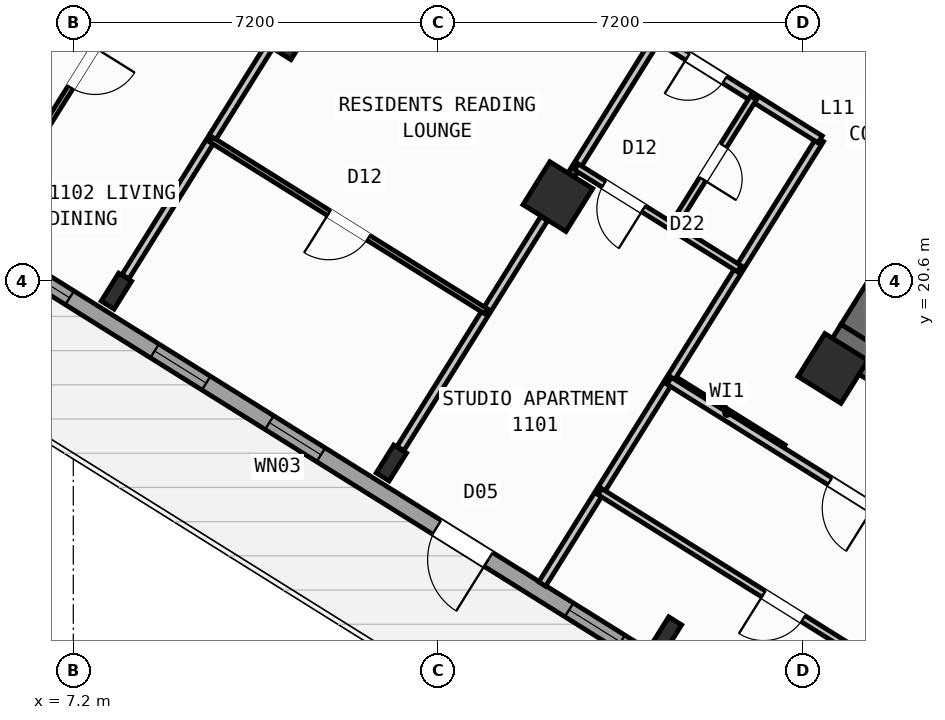
"""IFC4 building model, lengths in metres.
Left out: names, types, materials, properties, quantities, classifications, styles, units other than length and angle.
Written with IfcOpenShell. Run it as: python <this file> out.ifc"""

import sys

from ifc_helpers import new_model, si_unit, direction, frame, frame_2d, origin, origin_2d, place, context, subcontext, project, spatial, rectangle, hollow_rectangle, i_section, extrude, source, transform, mapped, element, fill, save


model = new_model("IFC4")
c1 = context("Model", 3, precision=1e-05, world=origin(), true_north=direction((0.0, 1.0)))
c2 = subcontext(c1, "Body", "Model", "MODEL_VIEW")
j1 = project(units=[si_unit("LENGTHUNIT", "METRE"), si_unit("PLANEANGLEUNIT", "RADIAN")], contexts=[c1])
p1 = place(None, origin())
s1 = spatial("IfcSite", under=j1, at=p1, CompositionType="ELEMENT")
p2 = place(p1, origin())
s2 = spatial("IfcBuilding", under=s1, at=p2, CompositionType="ELEMENT")
p3 = place(p2, frame((0.0, 0.0, 45.6)))
s3 = spatial("IfcBuildingStorey", under=s2, at=p3, CompositionType="ELEMENT", Elevation=45.6)
p4 = place(p3, frame((33.409, 12.45, 0.0), z_axis=(0.0, 0.0, 1.0), x_axis=(-0.848051132073, 0.529914405721, 0.0)))
e1 = element("IfcWall", 1, at=p4, inside=s3, PredefinedType="SHEAR", context=c2, shape_type="SweptSolid", body=[
    extrude(rectangle(XDim=13.24, YDim=0.65, at=frame_2d((6.62, 0.0))), origin(), (0.0, 0.0, 1.0), 3.35),
])
p5 = place(p3, frame((26.007, 24.976, 0.0), z_axis=(0.0, 0.0, 1.0), x_axis=(-0.529916319127, -0.848049936456, 0.0)))
e2 = element("IfcWall", 2, at=p5, inside=s3, PredefinedType="SHEAR", context=c2, shape_type="SweptSolid", body=[
    extrude(rectangle(XDim=6.375, YDim=0.65, at=frame_2d((3.188, 0.0))), origin(), (0.0, 0.0, 1.0), 3.35),
])
m1 = source(origin(), c2, "Body", "SweptSolid", [
    extrude(hollow_rectangle(XDim=1.0, YDim=1.0, WallThickness=0.04, at=origin_2d()), origin(), (0.0, 0.0, 1.0), 3.6),
])
p6 = place(p3, frame((22.191, 18.87, 0.0), z_axis=(0.0, 0.0, 1.0), x_axis=(-0.848048096156, 0.529919264233, 0.0)))
e3 = element("IfcColumn", 3, at=p6, inside=s3, PredefinedType="COLUMN", context=c2, shape_type="MappedRepresentation", body=[
    mapped(m1, transform((0.0, 0.0, 0.0), scale=1.0)),
])
m2 = source(origin(), c2, "Body", "SweptSolid", [
    extrude(i_section(OverallWidth=0.3, OverallDepth=0.65, WebThickness=0.016, FlangeThickness=0.031, at=origin_2d()), origin(), (0.0, 0.0, 1.0), 3.6),
])
p7 = place(p3, frame((18.906, 13.612, 0.0), z_axis=(0.0, 0.0, 1.0), x_axis=(-0.848048096156, 0.529919264233, 0.0)))
e4 = element("IfcColumn", 4, at=p7, inside=s3, PredefinedType="COLUMN", context=c2, shape_type="MappedRepresentation", body=[
    mapped(m2, transform((0.0, 0.0, 0.0), scale=1.0)),
])
p8 = place(p3, frame((16.764, 22.261, 0.0), z_axis=(0.0, 0.0, 1.0), x_axis=(-0.848048096156, 0.529919264233, 0.0)))
e5 = element("IfcColumn", 5, at=p8, inside=s3, PredefinedType="COLUMN", context=c2, shape_type="MappedRepresentation", body=[
    mapped(m1, transform((0.0, 0.0, 0.0), scale=1.0)),
])
p9 = place(p3, frame((13.478, 17.003, 0.0), z_axis=(0.0, 0.0, 1.0), x_axis=(-0.848048096156, 0.529919264233, 0.0)))
e6 = element("IfcColumn", 6, at=p9, inside=s3, PredefinedType="COLUMN", context=c2, shape_type="MappedRepresentation", body=[
    mapped(m2, transform((0.0, 0.0, 0.0), scale=1.0)),
])
p10 = place(p3, frame((11.336, 25.653, 0.0), z_axis=(0.0, 0.0, 1.0), x_axis=(-0.848048096156, 0.529919264233, 0.0)))
e7 = element("IfcColumn", 7, at=p10, inside=s3, PredefinedType="COLUMN", context=c2, shape_type="MappedRepresentation", body=[
    mapped(m1, transform((0.0, 0.0, 0.0), scale=1.0)),
])
p11 = place(p3, frame((8.051, 20.395, 0.0), z_axis=(0.0, 0.0, 1.0), x_axis=(-0.848048096156, 0.529919264233, 0.0)))
e8 = element("IfcColumn", 8, at=p11, inside=s3, PredefinedType="COLUMN", context=c2, shape_type="MappedRepresentation", body=[
    mapped(m2, transform((0.0, 0.0, 0.0), scale=1.0)),
])
p12 = place(p3, frame((29.268, 6.429, 0.0), z_axis=(0.0, 0.0, 1.0), x_axis=(-0.848049971435, 0.529916263149, 0.0)))
e9 = element("IfcWall", 9, at=p12, inside=s3, PredefinedType="STANDARD", context=c2, shape_type="SweptSolid", body=[
    extrude(rectangle(XDim=31.588, YDim=0.32, at=frame_2d((15.794, 0.0))), origin(), (0.0, 0.0, 1.0), 3.35),
])
p13 = place(p12, frame((16.362, 0.0, 0.0)))
e10 = element("IfcOpeningElement", 10, at=p13, cuts=e9, PredefinedType="OPENING", context=c2, shape_type="SweptSolid", body=[
    extrude(rectangle(XDim=1.2, YDim=2.15, at=frame_2d((0.6, 1.075))), frame((0.0, 0.17, 0.0), z_axis=(0.0, -1.0, 0.0), x_axis=(1.0, 0.0, 0.0)), (0.0, 0.0, 1.0), 0.34),
])
p14 = place(p12, frame((2.989, 0.0, 0.8)))
e11 = element("IfcOpeningElement", 11, at=p14, cuts=e9, PredefinedType="OPENING", context=c2, shape_type="SweptSolid", body=[
    extrude(rectangle(XDim=2.1, YDim=1.55, at=frame_2d((1.05, 0.775))), frame((0.0, 0.17, 0.0), z_axis=(0.0, -1.0, 0.0), x_axis=(1.0, 0.0, 0.0)), (0.0, 0.0, 1.0), 0.34),
])
p15 = place(p12, frame((8.359, 0.0, 0.8)))
e12 = element("IfcOpeningElement", 12, at=p15, cuts=e9, PredefinedType="OPENING", context=c2, shape_type="SweptSolid", body=[
    extrude(rectangle(XDim=2.1, YDim=1.55, at=frame_2d((1.05, 0.775))), frame((0.0, 0.17, 0.0), z_axis=(0.0, -1.0, 0.0), x_axis=(1.0, 0.0, 0.0)), (0.0, 0.0, 1.0), 0.34),
])
p16 = place(p12, frame((13.284, 0.0, 0.95)))
e13 = element("IfcOpeningElement", 13, at=p16, cuts=e9, PredefinedType="OPENING", context=c2, shape_type="SweptSolid", body=[
    extrude(rectangle(XDim=1.2, YDim=1.4, at=frame_2d((0.6, 0.7))), frame((0.0, 0.17, 0.0), z_axis=(0.0, -1.0, 0.0), x_axis=(1.0, 0.0, 0.0)), (0.0, 0.0, 1.0), 0.34),
])
p17 = place(p12, frame((20.259, 0.0, 0.95)))
e14 = element("IfcOpeningElement", 14, at=p17, cuts=e9, PredefinedType="OPENING", context=c2, shape_type="SweptSolid", body=[
    extrude(rectangle(XDim=1.2, YDim=1.4, at=frame_2d((0.6, 0.7))), frame((0.0, 0.17, 0.0), z_axis=(0.0, -1.0, 0.0), x_axis=(1.0, 0.0, 0.0)), (0.0, 0.0, 1.0), 0.34),
])
p18 = place(p12, frame((22.929, 0.0, 0.95)))
e15 = element("IfcOpeningElement", 15, at=p18, cuts=e9, PredefinedType="OPENING", context=c2, shape_type="SweptSolid", body=[
    extrude(rectangle(XDim=1.2, YDim=1.4, at=frame_2d((0.6, 0.7))), frame((0.0, 0.17, 0.0), z_axis=(0.0, -1.0, 0.0), x_axis=(1.0, 0.0, 0.0)), (0.0, 0.0, 1.0), 0.34),
])
p19 = place(p12, frame((26.106, 0.0, 0.85)))
e16 = element("IfcOpeningElement", 16, at=p19, cuts=e9, PredefinedType="OPENING", context=c2, shape_type="SweptSolid", body=[
    extrude(rectangle(XDim=1.5, YDim=1.5, at=frame_2d((0.75, 0.75))), frame((0.0, 0.17, 0.0), z_axis=(0.0, -1.0, 0.0), x_axis=(1.0, 0.0, 0.0)), (0.0, 0.0, 1.0), 0.34),
])
p20 = place(p12, frame((29.068, 0.0, 0.85)))
e17 = element("IfcOpeningElement", 17, at=p20, cuts=e9, PredefinedType="OPENING", context=c2, shape_type="SweptSolid", body=[
    extrude(rectangle(XDim=1.8, YDim=1.5, at=frame_2d((0.9, 0.75))), frame((0.0, 0.17, 0.0), z_axis=(0.0, -1.0, 0.0), x_axis=(1.0, 0.0, 0.0)), (0.0, 0.0, 1.0), 0.34),
])
p21 = place(p3, frame((2.415, 23.452, 0.0), z_axis=(0.0, 0.0, 1.0), x_axis=(0.52991049553, 0.848053575387, 0.0)))
e18 = element("IfcWall", 18, at=p21, inside=s3, PredefinedType="STANDARD", context=c2, shape_type="SweptSolid", body=[
    extrude(rectangle(XDim=21.587, YDim=0.32, at=frame_2d((10.794, 0.0))), origin(), (0.0, 0.0, 1.0), 2.725),
])
p22 = place(p21, frame((2.356, 0.0, 0.8)))
e19 = element("IfcOpeningElement", 19, at=p22, cuts=e18, PredefinedType="OPENING", context=c2, shape_type="SweptSolid", body=[
    extrude(rectangle(XDim=2.1, YDim=1.55, at=frame_2d((1.05, 0.775))), frame((0.0, 0.17, 0.0), z_axis=(0.0, -1.0, 0.0), x_axis=(1.0, 0.0, 0.0)), (0.0, 0.0, 1.0), 0.34),
])
p23 = place(p21, frame((8.639, 0.0, 1.0)))
e20 = element("IfcOpeningElement", 20, at=p23, cuts=e18, PredefinedType="OPENING", context=c2, shape_type="SweptSolid", body=[
    extrude(rectangle(XDim=0.9, YDim=1.25, at=frame_2d((0.45, 0.625))), frame((0.0, 0.17, 0.0), z_axis=(0.0, -1.0, 0.0), x_axis=(1.0, 0.0, 0.0)), (0.0, 0.0, 1.0), 0.34),
])
p24 = place(p21, frame((17.129, 0.0, 0.85)))
e21 = element("IfcOpeningElement", 21, at=p24, cuts=e18, PredefinedType="OPENING", context=c2, shape_type="SweptSolid", body=[
    extrude(rectangle(XDim=1.5, YDim=1.5, at=frame_2d((0.75, 0.75))), frame((0.0, 0.17, 0.0), z_axis=(0.0, -1.0, 0.0), x_axis=(1.0, 0.0, 0.0)), (0.0, 0.0, 1.0), 0.34),
])
p25 = place(p3, frame((14.138, 41.825, 0.0), z_axis=(0.0, 0.0, 1.0), x_axis=(0.848046498049, -0.529921821731, 0.0)))
e22 = element("IfcWall", 22, at=p25, inside=s3, PredefinedType="STANDARD", context=c2, shape_type="SweptSolid", body=[
    extrude(rectangle(XDim=31.588, YDim=0.32, at=frame_2d((15.794, 0.0))), origin(), (0.0, 0.0, 1.0), 3.35),
])
p26 = place(p25, frame((3.159, 0.0, 0.0)))
e23 = element("IfcOpeningElement", 23, at=p26, cuts=e22, PredefinedType="OPENING", context=c2, shape_type="SweptSolid", body=[
    extrude(rectangle(XDim=1.05, YDim=2.15, at=frame_2d((0.525, 1.075))), frame((0.0, 0.17, 0.0), z_axis=(0.0, -1.0, 0.0), x_axis=(1.0, 0.0, 0.0)), (0.0, 0.0, 1.0), 0.34),
])
p27 = place(p25, frame((0.906, 0.0, 1.0)))
e24 = element("IfcOpeningElement", 24, at=p27, cuts=e22, PredefinedType="OPENING", context=c2, shape_type="SweptSolid", body=[
    extrude(rectangle(XDim=0.9, YDim=1.25, at=frame_2d((0.45, 0.625))), frame((0.0, 0.17, 0.0), z_axis=(0.0, -1.0, 0.0), x_axis=(1.0, 0.0, 0.0)), (0.0, 0.0, 1.0), 0.34),
])
p28 = place(p25, frame((9.537, 0.0, 0.85)))
e25 = element("IfcOpeningElement", 25, at=p28, cuts=e22, PredefinedType="OPENING", context=c2, shape_type="SweptSolid", body=[
    extrude(rectangle(XDim=1.8, YDim=1.5, at=frame_2d((0.9, 0.75))), frame((0.0, 0.17, 0.0), z_axis=(0.0, -1.0, 0.0), x_axis=(1.0, 0.0, 0.0)), (0.0, 0.0, 1.0), 0.34),
])
p29 = place(p25, frame((13.899, 0.0, 0.85)))
e26 = element("IfcOpeningElement", 26, at=p29, cuts=e22, PredefinedType="OPENING", context=c2, shape_type="SweptSolid", body=[
    extrude(rectangle(XDim=1.5, YDim=1.5, at=frame_2d((0.75, 0.75))), frame((0.0, 0.17, 0.0), z_axis=(0.0, -1.0, 0.0), x_axis=(1.0, 0.0, 0.0)), (0.0, 0.0, 1.0), 0.34),
])
p30 = place(p25, frame((22.019, 0.0, 0.95)))
e27 = element("IfcOpeningElement", 27, at=p30, cuts=e22, PredefinedType="OPENING", context=c2, shape_type="SweptSolid", body=[
    extrude(rectangle(XDim=1.2, YDim=1.4, at=frame_2d((0.6, 0.7))), frame((0.0, 0.17, 0.0), z_axis=(0.0, -1.0, 0.0), x_axis=(1.0, 0.0, 0.0)), (0.0, 0.0, 1.0), 0.34),
])
p31 = place(p25, frame((27.569, 0.0, 0.95)))
e28 = element("IfcOpeningElement", 28, at=p31, cuts=e22, PredefinedType="OPENING", context=c2, shape_type="SweptSolid", body=[
    extrude(rectangle(XDim=1.2, YDim=1.4, at=frame_2d((0.6, 0.7))), frame((0.0, 0.17, 0.0), z_axis=(0.0, -1.0, 0.0), x_axis=(1.0, 0.0, 0.0)), (0.0, 0.0, 1.0), 0.34),
])
p32 = place(p3, frame((21.206, 17.292, 0.0), z_axis=(0.0, 0.0, 1.0), x_axis=(-0.848050851465, 0.529914854792, 0.0)))
e29 = element("IfcWall", 29, at=p32, inside=s3, PredefinedType="PARTITIONING", context=c2, shape_type="SweptSolid", body=[
    extrude(rectangle(XDim=2.61, YDim=0.16, at=frame_2d((1.305, 0.0))), origin(), (0.0, 0.0, 1.0), 3.34),
])
p33 = place(p3, frame((21.938, 23.391, 0.0), z_axis=(0.0, 0.0, 1.0), x_axis=(-0.529924725692, -0.848044683434, 0.0)))
e30 = element("IfcWall", 30, at=p33, inside=s3, PredefinedType="PARTITIONING", context=c2, shape_type="SweptSolid", body=[
    extrude(rectangle(XDim=10.35, YDim=0.16, at=frame_2d((5.175, 0.0))), origin(), (0.0, 0.0, 1.0), 3.34),
])
p34 = place(p3, frame((21.938, 23.391, 0.0), z_axis=(0.0, 0.0, 1.0), x_axis=(-0.848045850158, 0.529922858565, 0.0)))
e31 = element("IfcWall", 31, at=p34, inside=s3, PredefinedType="PARTITIONING", context=c2, shape_type="SweptSolid", body=[
    extrude(rectangle(XDim=16.73, YDim=0.16, at=frame_2d((8.365, 0.0))), origin(), (0.0, 0.0, 1.0), 3.34),
])
p35 = place(p34, frame((2.22, 0.0, 0.0)))
e32 = element("IfcOpeningElement", 32, at=p35, cuts=e31, PredefinedType="OPENING", context=c2, shape_type="SweptSolid", body=[
    extrude(rectangle(XDim=0.86, YDim=2.05, at=frame_2d((0.43, 1.025))), frame((0.0, 0.09, 0.0), z_axis=(0.0, -1.0, 0.0), x_axis=(1.0, 0.0, 0.0)), (0.0, 0.0, 1.0), 0.18),
])
p36 = place(p34, frame((6.49, 0.0, 0.0)))
e33 = element("IfcOpeningElement", 33, at=p36, cuts=e31, PredefinedType="OPENING", context=c2, shape_type="SweptSolid", body=[
    extrude(rectangle(XDim=1.0, YDim=2.1, at=frame_2d((0.5, 1.05))), frame((0.0, 0.09, 0.0), z_axis=(0.0, -1.0, 0.0), x_axis=(1.0, 0.0, 0.0)), (0.0, 0.0, 1.0), 0.18),
])
p37 = place(p34, frame((11.14, 0.0, 0.0)))
e34 = element("IfcOpeningElement", 34, at=p37, cuts=e31, PredefinedType="OPENING", context=c2, shape_type="SweptSolid", body=[
    extrude(rectangle(XDim=1.0, YDim=2.1, at=frame_2d((0.5, 1.05))), frame((0.0, 0.09, 0.0), z_axis=(0.0, -1.0, 0.0), x_axis=(1.0, 0.0, 0.0)), (0.0, 0.0, 1.0), 0.18),
])
p38 = place(p3, frame((18.724, 25.399, 0.0), z_axis=(0.0, 0.0, 1.0), x_axis=(-0.529930102756, -0.848041323399, 0.0)))
e35 = element("IfcWall", 35, at=p38, inside=s3, PredefinedType="PARTITIONING", context=c2, shape_type="SweptSolid", body=[
    extrude(rectangle(XDim=3.188, YDim=0.16, at=frame_2d((1.594, 0.0))), origin(), (0.0, 0.0, 1.0), 2.725),
])
p39 = place(p3, frame((16.492, 21.827, 0.0), z_axis=(0.0, 0.0, 1.0), x_axis=(-0.529904608059, -0.848057254175, 0.0)))
e36 = element("IfcWall", 36, at=p39, inside=s3, PredefinedType="PARTITIONING", context=c2, shape_type="SweptSolid", body=[
    extrude(rectangle(XDim=5.351, YDim=0.16, at=frame_2d((2.675, 0.0))), origin(), (0.0, 0.0, 1.0), 2.725),
])
p40 = place(p3, frame((20.343, 20.838, 0.0), z_axis=(0.0, 0.0, 1.0), x_axis=(-0.848059820872, 0.529900500304, 0.0)))
e37 = element("IfcWall", 37, at=p40, inside=s3, PredefinedType="PLUMBINGWALL", context=c2, shape_type="SweptSolid", body=[
    extrude(rectangle(XDim=3.79, YDim=0.14, at=frame_2d((1.895, 0.0))), origin(), (0.0, 0.0, 1.0), 3.34),
])
p41 = place(p40, frame((2.23, 0.0, 0.0)))
e38 = element("IfcOpeningElement", 38, at=p41, cuts=e37, PredefinedType="OPENING", context=c2, shape_type="SweptSolid", body=[
    extrude(rectangle(XDim=0.92, YDim=2.08, at=frame_2d((0.46, 1.04))), frame((0.0, 0.08, 0.0), z_axis=(0.0, -1.0, 0.0), x_axis=(1.0, 0.0, 0.0)), (0.0, 0.0, 1.0), 0.16),
])
p42 = place(p3, frame((20.624, 24.212, 0.0), z_axis=(0.0, 0.0, 1.0), x_axis=(-0.529940615993, -0.848034753722, 0.0)))
e39 = element("IfcWall", 39, at=p42, inside=s3, PredefinedType="PLUMBINGWALL", context=c2, shape_type="SweptSolid", body=[
    extrude(rectangle(XDim=3.01, YDim=0.14, at=frame_2d((1.505, 0.0))), origin(), (0.0, 0.0, 1.0), 2.995),
])
p43 = place(p42, frame((1.115, 0.0, 0.0)))
e40 = element("IfcOpeningElement", 40, at=p43, cuts=e39, PredefinedType="OPENING", context=c2, shape_type="SweptSolid", body=[
    extrude(rectangle(XDim=0.78, YDim=2.05, at=frame_2d((0.39, 1.025))), frame((0.0, 0.08, 0.0), z_axis=(0.0, -1.0, 0.0), x_axis=(1.0, 0.0, 0.0)), (0.0, 0.0, 1.0), 0.16),
])
p44 = place(p3, frame((11.065, 25.219, 0.0), z_axis=(0.0, 0.0, 1.0), x_axis=(-0.529904608059, -0.848057254175, 0.0)))
e41 = element("IfcWall", 41, at=p44, inside=s3, PredefinedType="PARTITIONING", context=c2, shape_type="SweptSolid", body=[
    extrude(rectangle(XDim=5.351, YDim=0.16, at=frame_2d((2.675, 0.0))), origin(), (0.0, 0.0, 1.0), 2.725),
])
p45 = place(p3, frame((15.348, 19.995, 0.0), z_axis=(0.0, 0.0, 1.0), x_axis=(-0.848056163074, 0.529906354247, 0.0)))
e42 = element("IfcWall", 42, at=p45, inside=s3, PredefinedType="PARTITIONING", context=c2, shape_type="SweptSolid", body=[
    extrude(rectangle(XDim=6.4, YDim=0.11, at=frame_2d((3.2, 0.0))), origin(), (0.0, 0.0, 1.0), 3.34),
])
p46 = place(p45, frame((2.74, 0.0, 0.0)))
e43 = element("IfcOpeningElement", 43, at=p46, cuts=e42, PredefinedType="OPENING", context=c2, shape_type="SweptSolid", body=[
    extrude(rectangle(XDim=0.92, YDim=2.08, at=frame_2d((0.46, 1.04))), frame((0.0, 0.065, 0.0), z_axis=(0.0, -1.0, 0.0), x_axis=(1.0, 0.0, 0.0)), (0.0, 0.0, 1.0), 0.13),
])
p47 = place(p3, frame((10.837, 30.327, 0.0), z_axis=(0.0, 0.0, 1.0), x_axis=(-0.529912148489, -0.848052542525, 0.0)))
e44 = element("IfcWall", 44, at=p47, inside=s3, PredefinedType="PARTITIONING", context=c2, shape_type="SweptSolid", body=[
    extrude(rectangle(XDim=10.62, YDim=0.11, at=frame_2d((5.31, 0.0))), origin(), (0.0, 0.0, 1.0), 3.34),
])
p48 = place(p47, frame((0.76, 0.0, 0.0)))
e45 = element("IfcOpeningElement", 45, at=p48, cuts=e44, PredefinedType="OPENING", context=c2, shape_type="SweptSolid", body=[
    extrude(rectangle(XDim=0.78, YDim=2.05, at=frame_2d((0.39, 1.025))), frame((0.0, 0.065, 0.0), z_axis=(0.0, -1.0, 0.0), x_axis=(1.0, 0.0, 0.0)), (0.0, 0.0, 1.0), 0.13),
])
p49 = place(p47, frame((6.05, 0.0, 0.0)))
e46 = element("IfcOpeningElement", 46, at=p49, cuts=e44, PredefinedType="OPENING", context=c2, shape_type="SweptSolid", body=[
    extrude(rectangle(XDim=0.92, YDim=2.08, at=frame_2d((0.46, 1.04))), frame((0.0, 0.065, 0.0), z_axis=(0.0, -1.0, 0.0), x_axis=(1.0, 0.0, 0.0)), (0.0, 0.0, 1.0), 0.13),
])
p50 = place(p3, frame((32.164, 10.374, 0.0), z_axis=(0.0, 0.0, 1.0), x_axis=(-0.848044107957, 0.529925646633, 0.0)))
e47 = element("IfcWall", 47, at=p50, inside=s3, PredefinedType="PARTITIONING", context=c2, shape_type="SweptSolid", body=[
    extrude(rectangle(XDim=15.57, YDim=0.16, at=frame_2d((7.785, 0.0))), origin(), (0.0, 0.0, 1.0), 3.34),
])
p51 = place(p50, frame((10.83, 0.0, 0.0)))
e48 = element("IfcOpeningElement", 48, at=p51, cuts=e47, PredefinedType="OPENING", context=c2, shape_type="SweptSolid", body=[
    extrude(rectangle(XDim=1.0, YDim=2.1, at=frame_2d((0.5, 1.05))), frame((0.0, 0.09, 0.0), z_axis=(0.0, -1.0, 0.0), x_axis=(1.0, 0.0, 0.0)), (0.0, 0.0, 1.0), 0.18),
])
p52 = place(p3, frame((29.72, 8.859, 0.0), z_axis=(0.0, 0.0, 1.0), x_axis=(-0.848049134363, 0.529917602752, 0.0)))
e49 = element("IfcWall", 49, at=p52, inside=s3, PredefinedType="PLUMBINGWALL", context=c2, shape_type="SweptSolid", body=[
    extrude(rectangle(XDim=14.3, YDim=0.14, at=frame_2d((7.15, 0.0))), origin(), (0.0, 0.0, 1.0), 3.34),
])
p53 = place(p52, frame((9.57, 0.0, 0.0)))
e50 = element("IfcOpeningElement", 50, at=p53, cuts=e49, PredefinedType="OPENING", context=c2, shape_type="SweptSolid", body=[
    extrude(rectangle(XDim=0.92, YDim=2.08, at=frame_2d((0.46, 1.04))), frame((0.0, 0.08, 0.0), z_axis=(0.0, -1.0, 0.0), x_axis=(1.0, 0.0, 0.0)), (0.0, 0.0, 1.0), 0.16),
])
m3 = source(origin(), c2, "Body", "SweptSolid", [
    extrude(rectangle(XDim=1.2, YDim=2.15, at=frame_2d((0.6, 1.075))), frame((0.0, 0.025, 0.0), z_axis=(0.0, -1.0, 0.0), x_axis=(1.0, 0.0, 0.0)), (0.0, 0.0, 1.0), 0.05),
])
p54 = place(p13, origin())
e51 = element("IfcDoor", 51, at=p54, inside=s3, OperationType="SINGLE_SWING_LEFT", PredefinedType="DOOR", context=c2, shape_type="MappedRepresentation", body=[
    mapped(m3, transform((0.0, 0.0, 0.0), scale=1.0)),
])
fill(e10, e51)
m4 = source(origin(), c2, "Body", "SweptSolid", [
    extrude(rectangle(XDim=1.2, YDim=1.4, at=frame_2d((0.6, 0.7))), frame((0.0, 0.03, 0.0), z_axis=(0.0, -1.0, 0.0), x_axis=(1.0, 0.0, 0.0)), (0.0, 0.0, 1.0), 0.06),
])
p55 = place(p16, origin())
e52 = element("IfcWindow", 52, at=p55, inside=s3, PartitioningType="SINGLE_PANEL", PredefinedType="WINDOW", context=c2, shape_type="MappedRepresentation", body=[
    mapped(m4, transform((0.0, 0.0, 0.0), scale=1.0)),
])
fill(e13, e52)
p56 = place(p17, origin())
e53 = element("IfcWindow", 53, at=p56, inside=s3, PartitioningType="SINGLE_PANEL", PredefinedType="WINDOW", context=c2, shape_type="MappedRepresentation", body=[
    mapped(m4, transform((0.0, 0.0, 0.0), scale=1.0)),
])
fill(e14, e53)
p57 = place(p18, origin())
e54 = element("IfcWindow", 54, at=p57, inside=s3, PartitioningType="SINGLE_PANEL", PredefinedType="WINDOW", context=c2, shape_type="MappedRepresentation", body=[
    mapped(m4, transform((0.0, 0.0, 0.0), scale=1.0)),
])
fill(e15, e54)
m5 = source(origin(), c2, "Body", "SweptSolid", [
    extrude(rectangle(XDim=1.5, YDim=1.5, at=frame_2d((0.75, 0.75))), frame((0.0, 0.03, 0.0), z_axis=(0.0, -1.0, 0.0), x_axis=(1.0, 0.0, 0.0)), (0.0, 0.0, 1.0), 0.06),
])
p58 = place(p19, origin())
e55 = element("IfcWindow", 55, at=p58, inside=s3, PartitioningType="SINGLE_PANEL", PredefinedType="WINDOW", context=c2, shape_type="MappedRepresentation", body=[
    mapped(m5, transform((0.0, 0.0, 0.0), scale=1.0)),
])
fill(e16, e55)
m6 = source(origin(), c2, "Body", "SweptSolid", [
    extrude(rectangle(XDim=0.86, YDim=2.05, at=frame_2d((0.43, 1.025))), frame((0.0, 0.025, 0.0), z_axis=(0.0, -1.0, 0.0), x_axis=(1.0, 0.0, 0.0)), (0.0, 0.0, 1.0), 0.05),
])
p59 = place(p35, origin())
e56 = element("IfcDoor", 56, at=p59, inside=s3, OperationType="SINGLE_SWING_RIGHT", PredefinedType="DOOR", context=c2, shape_type="MappedRepresentation", body=[
    mapped(m6, transform((0.0, 0.0, 0.0), scale=1.0)),
])
fill(e32, e56)
m7 = source(origin(), c2, "Body", "SweptSolid", [
    extrude(rectangle(XDim=0.92, YDim=2.08, at=frame_2d((0.46, 1.04))), frame((0.0, 0.025, 0.0), z_axis=(0.0, -1.0, 0.0), x_axis=(1.0, 0.0, 0.0)), (0.0, 0.0, 1.0), 0.05),
])
p60 = place(p41, origin())
e57 = element("IfcDoor", 57, at=p60, inside=s3, OperationType="SINGLE_SWING_LEFT", PredefinedType="DOOR", context=c2, shape_type="MappedRepresentation", body=[
    mapped(m7, transform((0.0, 0.0, 0.0), scale=1.0)),
])
fill(e38, e57)
m8 = source(origin(), c2, "Body", "SweptSolid", [
    extrude(rectangle(XDim=0.78, YDim=2.05, at=frame_2d((0.39, 1.025))), frame((0.0, 0.025, 0.0), z_axis=(0.0, -1.0, 0.0), x_axis=(1.0, 0.0, 0.0)), (0.0, 0.0, 1.0), 0.05),
])
p61 = place(p43, origin())
e58 = element("IfcDoor", 58, at=p61, inside=s3, OperationType="SINGLE_SWING_RIGHT", PredefinedType="DOOR", context=c2, shape_type="MappedRepresentation", body=[
    mapped(m8, transform((0.0, 0.0, 0.0), scale=1.0)),
])
fill(e40, e58)
p62 = place(p46, origin())
e59 = element("IfcDoor", 59, at=p62, inside=s3, OperationType="SINGLE_SWING_RIGHT", PredefinedType="DOOR", context=c2, shape_type="MappedRepresentation", body=[
    mapped(m7, transform((0.0, 0.0, 0.0), scale=1.0)),
])
fill(e43, e59)
p63 = place(p49, origin())
e60 = element("IfcDoor", 60, at=p63, inside=s3, OperationType="SINGLE_SWING_LEFT", PredefinedType="DOOR", context=c2, shape_type="MappedRepresentation", body=[
    mapped(m7, transform((0.0, 0.0, 0.0), scale=1.0)),
])
fill(e46, e60)
m9 = source(origin(), c2, "Body", "SweptSolid", [
    extrude(rectangle(XDim=1.0, YDim=2.1, at=frame_2d((0.5, 1.05))), frame((0.0, 0.025, 0.0), z_axis=(0.0, -1.0, 0.0), x_axis=(1.0, 0.0, 0.0)), (0.0, 0.0, 1.0), 0.05),
])
p64 = place(p51, origin())
e61 = element("IfcDoor", 61, at=p64, inside=s3, OperationType="SINGLE_SWING_LEFT", PredefinedType="DOOR", context=c2, shape_type="MappedRepresentation", body=[
    mapped(m9, transform((0.0, 0.0, 0.0), scale=1.0)),
])
fill(e48, e61)
p65 = place(p53, origin())
e62 = element("IfcDoor", 62, at=p65, inside=s3, OperationType="SINGLE_SWING_RIGHT", PredefinedType="DOOR", context=c2, shape_type="MappedRepresentation", body=[
    mapped(m7, transform((0.0, 0.0, 0.0), scale=1.0)),
])
fill(e50, e62)
save(model, sys.argv[1])
